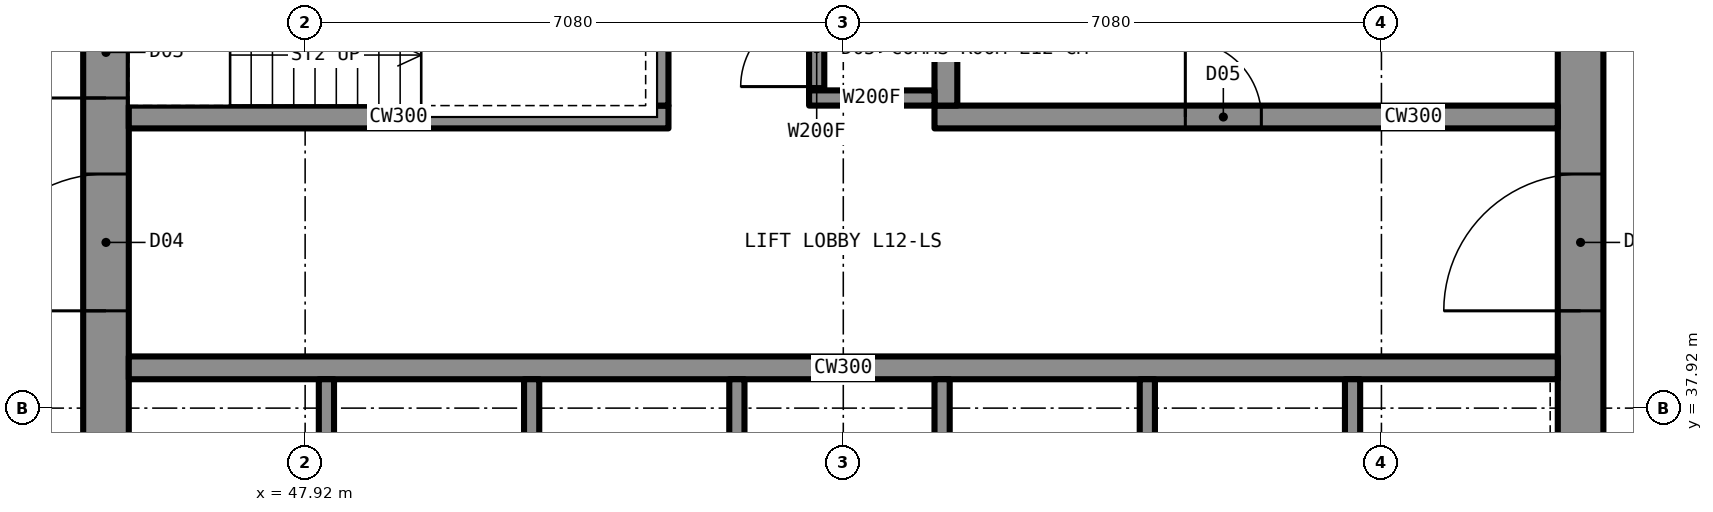
"""IFC4 building model, lengths in metres.
Left out: names, types, materials, properties, quantities, classifications, styles, units other than length and angle.
Written with IfcOpenShell. Run it as: python <this file> out.ifc"""

import sys

from ifc_helpers import new_model, si_unit, direction, frame, frame_2d, origin, place, context, subcontext, project, spatial, rectangle, extrude, element, fill, save


model = new_model("IFC4")
c1 = context("Model", 3, precision=1e-05, world=origin(), true_north=direction((0.0, 1.0)))
c2 = subcontext(c1, "Body", "Model", "MODEL_VIEW")
j1 = project(units=[si_unit("LENGTHUNIT", "METRE"), si_unit("PLANEANGLEUNIT", "RADIAN")], contexts=[c1])
p1 = place(None, origin())
s1 = spatial("IfcSite", under=j1, at=p1, CompositionType="ELEMENT")
p2 = place(p1, origin())
s2 = spatial("IfcBuilding", under=s1, at=p2, CompositionType="ELEMENT")
p3 = place(p2, frame((0.0, 0.0, 49.5)))
s3 = spatial("IfcBuildingStorey", under=s2, at=p3, CompositionType="ELEMENT", Elevation=49.5)
p4 = place(p3, frame((64.7, 35.6, 0.0), z_axis=(0.0, 0.0, 1.0), x_axis=(0.0, 1.0, 0.0)))
e1 = element("IfcWall", 1, at=p4, inside=s3, PredefinedType="SHEAR", context=c2, shape_type="SweptSolid", body=[
    extrude(rectangle(XDim=18.8, YDim=0.6, at=frame_2d((9.4, 0.0))), origin(), (0.0, 0.0, 1.0), 3.5),
])
p5 = place(p4, frame((13.4, 0.0, 0.0)))
e2 = element("IfcOpeningElement", 2, at=p5, cuts=e1, PredefinedType="OPENING", context=c2, shape_type="SweptSolid", body=[
    extrude(rectangle(XDim=1.8, YDim=2.2, at=frame_2d((0.9, 1.1))), frame((0.0, 0.31, 0.0), z_axis=(0.0, -1.0, 0.0), x_axis=(1.0, 0.0, 0.0)), (0.0, 0.0, 1.0), 0.62),
])
p6 = place(p4, frame((3.6, 0.0, 0.0)))
e3 = element("IfcOpeningElement", 3, at=p6, cuts=e1, PredefinedType="OPENING", context=c2, shape_type="SweptSolid", body=[
    extrude(rectangle(XDim=1.8, YDim=2.2, at=frame_2d((0.9, 1.1))), frame((0.0, 0.31, 0.0), z_axis=(0.0, -1.0, 0.0), x_axis=(1.0, 0.0, 0.0)), (0.0, 0.0, 1.0), 0.62),
])
p7 = place(p3, frame((45.3, 35.6, 0.0), z_axis=(0.0, 0.0, 1.0), x_axis=(0.0, 1.0, 0.0)))
e4 = element("IfcWall", 4, at=p7, inside=s3, PredefinedType="SHEAR", context=c2, shape_type="SweptSolid", body=[
    extrude(rectangle(XDim=18.8, YDim=0.6, at=frame_2d((9.4, 0.0))), origin(), (0.0, 0.0, 1.0), 3.5),
])
p8 = place(p7, frame((13.4, 0.0, 0.0)))
e5 = element("IfcOpeningElement", 5, at=p8, cuts=e4, PredefinedType="OPENING", context=c2, shape_type="SweptSolid", body=[
    extrude(rectangle(XDim=1.8, YDim=2.2, at=frame_2d((0.9, 1.1))), frame((0.0, 0.31, 0.0), z_axis=(0.0, -1.0, 0.0), x_axis=(1.0, 0.0, 0.0)), (0.0, 0.0, 1.0), 0.62),
])
p9 = place(p7, frame((3.6, 0.0, 0.0)))
e6 = element("IfcOpeningElement", 6, at=p9, cuts=e4, PredefinedType="OPENING", context=c2, shape_type="SweptSolid", body=[
    extrude(rectangle(XDim=1.8, YDim=2.2, at=frame_2d((0.9, 1.1))), frame((0.0, 0.31, 0.0), z_axis=(0.0, -1.0, 0.0), x_axis=(1.0, 0.0, 0.0)), (0.0, 0.0, 1.0), 0.62),
])
p10 = place(p7, frame((6.4, 0.0, 0.0)))
e7 = element("IfcOpeningElement", 7, at=p10, cuts=e4, PredefinedType="OPENING", context=c2, shape_type="SweptSolid", body=[
    extrude(rectangle(XDim=1.2, YDim=2.2, at=frame_2d((0.6, 1.1))), frame((0.0, 0.31, 0.0), z_axis=(0.0, -1.0, 0.0), x_axis=(1.0, 0.0, 0.0)), (0.0, 0.0, 1.0), 0.62),
])
p11 = place(p3, frame((45.6, 38.45, 0.0), z_axis=(0.0, 0.0, 1.0), x_axis=(1.0, 0.0, 0.0)))
e8 = element("IfcWall", 8, at=p11, inside=s3, PredefinedType="SHEAR", context=c2, shape_type="SweptSolid", body=[
    extrude(rectangle(XDim=18.8, YDim=0.3, at=frame_2d((9.4, 0.0))), origin(), (0.0, 0.0, 1.0), 3.5),
])
p12 = place(p3, frame((45.6, 41.75, 0.0), z_axis=(0.0, 0.0, 1.0), x_axis=(1.0, 0.0, 0.0)))
e9 = element("IfcWall", 9, at=p12, inside=s3, PredefinedType="SHEAR", context=c2, shape_type="SweptSolid", body=[
    extrude(rectangle(XDim=7.1, YDim=0.3, at=frame_2d((3.55, 0.0))), origin(), (0.0, 0.0, 1.0), 3.5),
])
p13 = place(p3, frame((56.2, 41.75, 0.0), z_axis=(0.0, 0.0, 1.0), x_axis=(1.0, 0.0, 0.0)))
e10 = element("IfcWall", 10, at=p13, inside=s3, PredefinedType="SHEAR", context=c2, shape_type="SweptSolid", body=[
    extrude(rectangle(XDim=8.2, YDim=0.3, at=frame_2d((4.1, 0.0))), origin(), (0.0, 0.0, 1.0), 3.5),
])
p14 = place(p13, frame((3.3, 0.0, 0.0)))
e11 = element("IfcOpeningElement", 11, at=p14, cuts=e10, PredefinedType="OPENING", context=c2, shape_type="SweptSolid", body=[
    extrude(rectangle(XDim=1.0, YDim=2.1, at=frame_2d((0.5, 1.05))), frame((0.0, 0.16, 0.0), z_axis=(0.0, -1.0, 0.0), x_axis=(1.0, 0.0, 0.0)), (0.0, 0.0, 1.0), 0.32),
])
p15 = place(p3, frame((52.55, 41.9, 0.0), z_axis=(0.0, 0.0, 1.0), x_axis=(0.0, 1.0, 0.0)))
e12 = element("IfcWall", 12, at=p15, inside=s3, PredefinedType="SHEAR", context=c2, shape_type="SweptSolid", body=[
    extrude(rectangle(XDim=6.2, YDim=0.3, at=frame_2d((3.1, 0.0))), origin(), (0.0, 0.0, 1.0), 3.5),
])
p16 = place(p15, frame((4.125, 0.0, 0.0)))
e13 = element("IfcOpeningElement", 13, at=p16, cuts=e12, PredefinedType="OPENING", context=c2, shape_type="SweptSolid", body=[
    extrude(rectangle(XDim=1.2, YDim=2.2, at=frame_2d((0.6, 1.1))), frame((0.0, 0.16, 0.0), z_axis=(0.0, -1.0, 0.0), x_axis=(1.0, 0.0, 0.0)), (0.0, 0.0, 1.0), 0.32),
])
p17 = place(p3, frame((56.35, 41.9, 0.0), z_axis=(0.0, 0.0, 1.0), x_axis=(0.0, 1.0, 0.0)))
e14 = element("IfcWall", 14, at=p17, inside=s3, PredefinedType="SHEAR", context=c2, shape_type="SweptSolid", body=[
    extrude(rectangle(XDim=9.5, YDim=0.3, at=frame_2d((4.75, 0.0))), origin(), (0.0, 0.0, 1.0), 3.5),
])
p18 = place(p17, frame((7.1, 0.0, 0.0)))
e15 = element("IfcOpeningElement", 15, at=p18, cuts=e14, PredefinedType="OPENING", context=c2, shape_type="SweptSolid", body=[
    extrude(rectangle(XDim=1.8, YDim=2.2, at=frame_2d((0.9, 1.1))), frame((0.0, 0.16, 0.0), z_axis=(0.0, -1.0, 0.0), x_axis=(1.0, 0.0, 0.0)), (0.0, 0.0, 1.0), 0.32),
])
p19 = place(p3, frame((54.65, 42.0, 0.0), z_axis=(0.0, 0.0, 1.0), x_axis=(0.0, 1.0, 0.0)))
e16 = element("IfcWall", 16, at=p19, inside=s3, PredefinedType="PARTITIONING", context=c2, shape_type="SweptSolid", body=[
    extrude(rectangle(XDim=1.3, YDim=0.2, at=frame_2d((0.65, 0.0))), origin(), (0.0, 0.0, 1.0), 3.33),
])
p20 = place(p19, frame((0.15, 0.0, 0.0)))
e17 = element("IfcOpeningElement", 17, at=p20, cuts=e16, PredefinedType="OPENING", context=c2, shape_type="SweptSolid", body=[
    extrude(rectangle(XDim=1.0, YDim=2.1, at=frame_2d((0.5, 1.05))), frame((0.0, 0.11, 0.0), z_axis=(0.0, -1.0, 0.0), x_axis=(1.0, 0.0, 0.0)), (0.0, 0.0, 1.0), 0.22),
])
p21 = place(p3, frame((54.55, 42.0, 0.0), z_axis=(0.0, 0.0, 1.0), x_axis=(1.0, 0.0, 0.0)))
e18 = element("IfcWall", 18, at=p21, inside=s3, PredefinedType="PARTITIONING", context=c2, shape_type="SweptSolid", body=[
    extrude(rectangle(XDim=1.65, YDim=0.2, at=frame_2d((0.825, 0.0))), origin(), (0.0, 0.0, 1.0), 3.33),
])
for number, where, z_axis, x_axis in (
    (19, (48.2, 35.6, 0.0), (0.0, 0.0, 1.0), (0.0, 1.0, 0.0)),
    (20, (50.9, 35.6, 0.0), (0.0, 0.0, 1.0), (0.0, 1.0, 0.0)),
    (21, (53.6, 35.6, 0.0), (0.0, 0.0, 1.0), (0.0, 1.0, 0.0)),
    (22, (56.3, 35.6, 0.0), (0.0, 0.0, 1.0), (0.0, 1.0, 0.0)),
    (23, (59.0, 35.6, 0.0), (0.0, 0.0, 1.0), (0.0, 1.0, 0.0)),
    (24, (61.7, 35.6, 0.0), (0.0, 0.0, 1.0), (0.0, 1.0, 0.0)),
):
    element("IfcWall", number, at=place(p3, frame(where, z_axis=z_axis, x_axis=x_axis)), inside=s3, PredefinedType="PARTITIONING", context=c2, shape_type="SweptSolid", body=[
        extrude(rectangle(XDim=2.7, YDim=0.2, at=frame_2d((1.35, 0.0))), origin(), (0.0, 0.0, 1.0), 3.33),
    ])
p22 = place(p20, origin())
e25 = element("IfcDoor", 25, at=p22, inside=s3, OperationType="SINGLE_SWING_LEFT", PredefinedType="DOOR", context=c2, shape_type="SweptSolid", body=[
    extrude(rectangle(XDim=1.0, YDim=2.1, at=frame_2d((0.5, 1.05))), frame((0.0, 0.025, 0.0), z_axis=(0.0, -1.0, 0.0), x_axis=(1.0, 0.0, 0.0)), (0.0, 0.0, 1.0), 0.05),
])
fill(e17, e25)
p23 = place(p9, origin())
e26 = element("IfcDoor", 26, at=p23, inside=s3, OperationType="DOUBLE_DOOR_SINGLE_SWING", PredefinedType="DOOR", context=c2, shape_type="SweptSolid", body=[
    extrude(rectangle(XDim=1.8, YDim=2.2, at=frame_2d((0.9, 1.1))), frame((0.0, 0.025, 0.0), z_axis=(0.0, -1.0, 0.0), x_axis=(1.0, 0.0, 0.0)), (0.0, 0.0, 1.0), 0.05),
])
fill(e6, e26)
p24 = place(p6, origin())
e27 = element("IfcDoor", 27, at=p24, inside=s3, OperationType="DOUBLE_DOOR_SINGLE_SWING", PredefinedType="DOOR", context=c2, shape_type="SweptSolid", body=[
    extrude(rectangle(XDim=1.8, YDim=2.2, at=frame_2d((0.9, 1.1))), frame((0.0, 0.025, 0.0), z_axis=(0.0, -1.0, 0.0), x_axis=(1.0, 0.0, 0.0)), (0.0, 0.0, 1.0), 0.05),
])
fill(e3, e27)
p25 = place(p10, origin())
e28 = element("IfcDoor", 28, at=p25, inside=s3, OperationType="SINGLE_SWING_LEFT", PredefinedType="DOOR", context=c2, shape_type="SweptSolid", body=[
    extrude(rectangle(XDim=1.2, YDim=2.2, at=frame_2d((0.6, 1.1))), frame((0.0, 0.025, 0.0), z_axis=(0.0, -1.0, 0.0), x_axis=(1.0, 0.0, 0.0)), (0.0, 0.0, 1.0), 0.05),
])
fill(e7, e28)
p26 = place(p14, origin())
e29 = element("IfcDoor", 29, at=p26, inside=s3, OperationType="SINGLE_SWING_LEFT", PredefinedType="DOOR", context=c2, shape_type="SweptSolid", body=[
    extrude(rectangle(XDim=1.0, YDim=2.1, at=frame_2d((0.5, 1.05))), frame((0.0, 0.025, 0.0), z_axis=(0.0, -1.0, 0.0), x_axis=(1.0, 0.0, 0.0)), (0.0, 0.0, 1.0), 0.05),
])
fill(e11, e29)
save(model, sys.argv[1])
